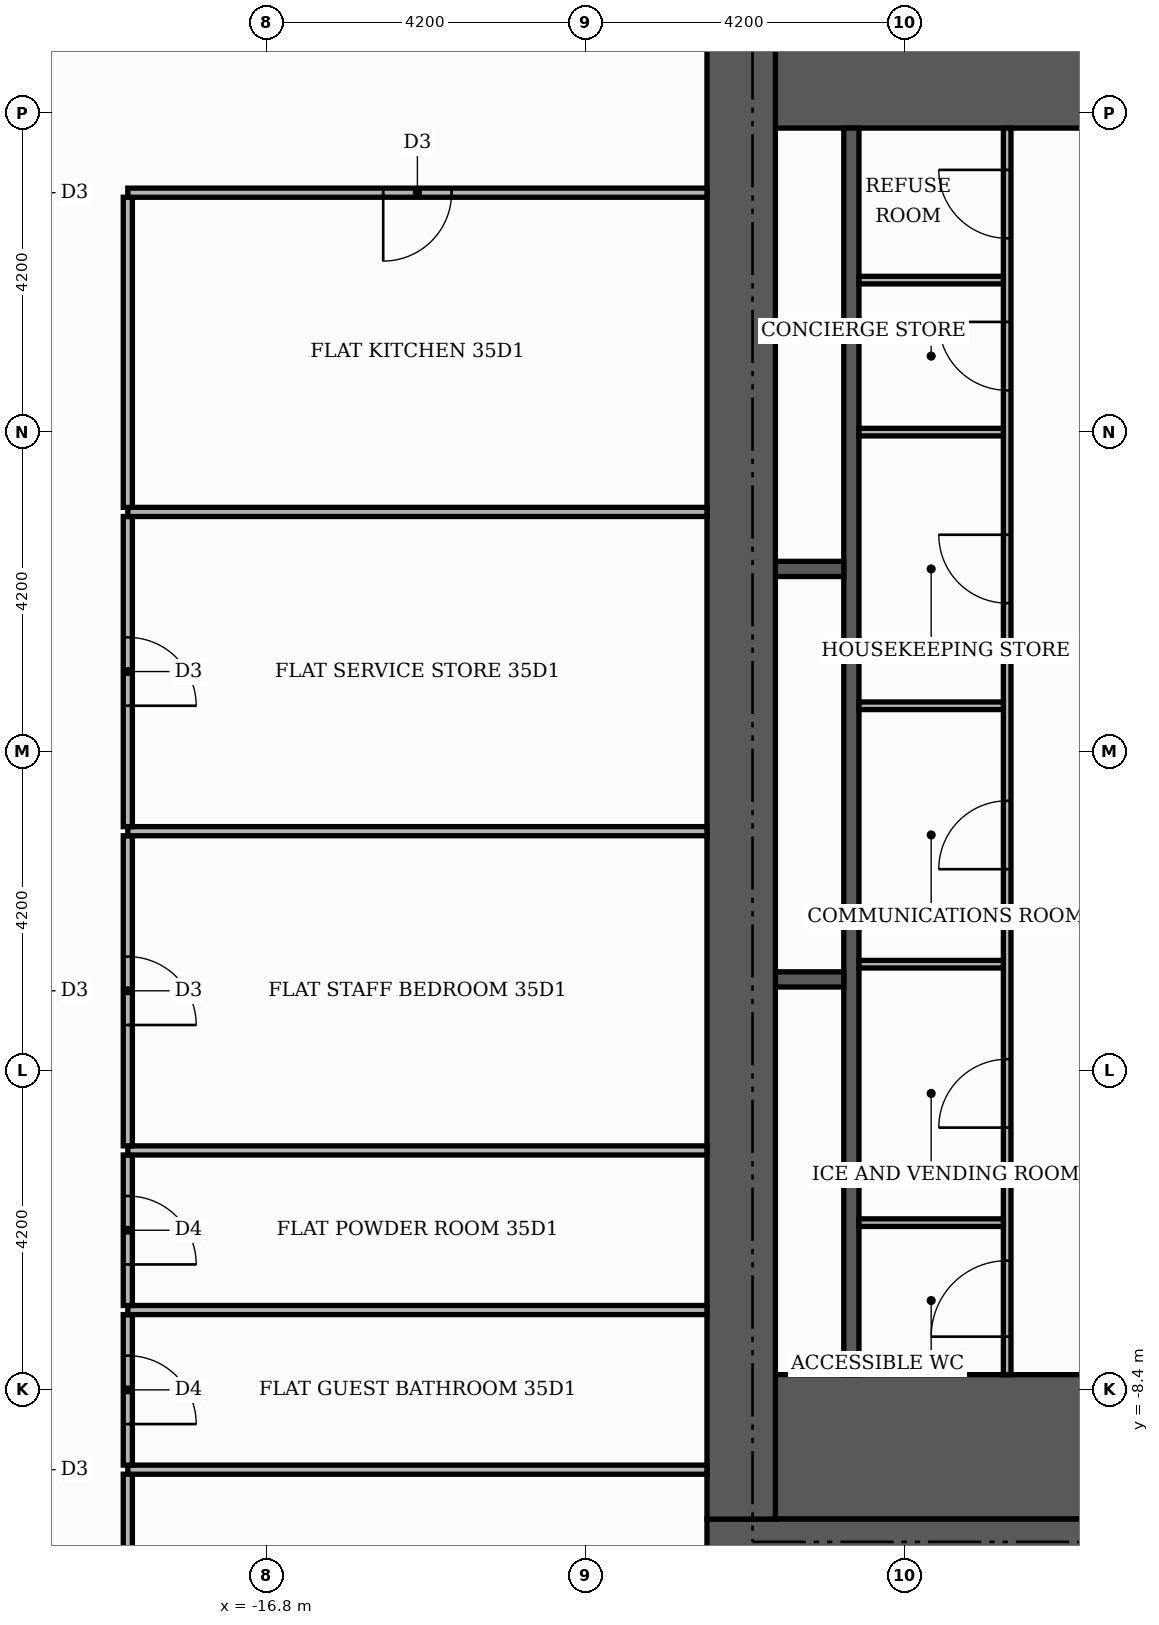
"""IFC4 building model, lengths in metres.
Left out: names, types, materials, properties, quantities, classifications, styles, units other than length and angle.
Written with IfcOpenShell. Run it as: python <this file> out.ifc"""

import sys

from ifc_helpers import new_model, si_unit, direction, frame, frame_2d, origin, place, context, subcontext, project, spatial, rectangle, extrude, element, fill, save


model = new_model("IFC4")
c1 = context("Model", 3, precision=1e-05, world=origin(), true_north=direction((0.0, 1.0)))
c2 = subcontext(c1, "Body", "Model", "MODEL_VIEW")
j1 = project(units=[si_unit("LENGTHUNIT", "METRE"), si_unit("PLANEANGLEUNIT", "RADIAN")], contexts=[c1])
p1 = place(None, origin())
s1 = spatial("IfcSite", under=j1, at=p1, CompositionType="ELEMENT")
p2 = place(p1, origin())
s2 = spatial("IfcBuilding", under=s1, at=p2, CompositionType="ELEMENT")
p3 = place(p2, frame((0.0, 0.0, 149.4)))
s3 = spatial("IfcBuildingStorey", under=s2, at=p3, CompositionType="ELEMENT", Elevation=149.4)
for number, where, z_axis, x_axis in (
    (1, (-10.1, -9.15, 0.0), (0.0, 0.0, 1.0), (1.0, 0.0, 0.0)),
    (2, (-10.1, 9.15, 0.0), (0.0, 0.0, 1.0), (1.0, 0.0, 0.0)),
):
    element("IfcWall", number, at=place(p3, frame(where, z_axis=z_axis, x_axis=x_axis)), inside=s3, PredefinedType="SHEAR", context=c2, shape_type="SweptSolid", body=[
        extrude(rectangle(XDim=4.6, YDim=1.9, at=frame_2d((2.3, 0.0))), origin(), (0.0, 0.0, 1.0), 3.48),
    ])
p4 = place(p3, frame((-9.1, -8.2, 0.0), z_axis=(0.0, 0.0, 1.0), x_axis=(0.0, 1.0, 0.0)))
e3 = element("IfcWall", 3, at=p4, inside=s3, PredefinedType="SHEAR", context=c2, shape_type="SweptSolid", body=[
    extrude(rectangle(XDim=16.4, YDim=0.2, at=frame_2d((8.2, 0.0))), origin(), (0.0, 0.0, 1.0), 3.48),
])
for number, where, z_axis, x_axis in (
    (4, (-10.1, -3.0, 0.0), (0.0, 0.0, 1.0), (1.0, 0.0, 0.0)),
    (5, (-10.1, 2.4, 0.0), (0.0, 0.0, 1.0), (1.0, 0.0, 0.0)),
):
    element("IfcWall", number, at=place(p3, frame(where, z_axis=z_axis, x_axis=x_axis)), inside=s3, PredefinedType="SHEAR", context=c2, shape_type="SweptSolid", body=[
        extrude(rectangle(XDim=0.9, YDim=0.2, at=frame_2d((0.45, 0.0))), origin(), (0.0, 0.0, 1.0), 3.48),
    ])
p5 = place(p3, frame((-11.0, -10.55, 0.0), z_axis=(0.0, 0.0, 1.0), x_axis=(1.0, 0.0, 0.0)))
e6 = element("IfcWall", 6, at=p5, inside=s3, PredefinedType="SHEAR", context=c2, shape_type="SweptSolid", body=[
    extrude(rectangle(XDim=22.0, YDim=0.9, at=frame_2d((11.0, 0.0))), origin(), (0.0, 0.0, 1.0), 3.48),
])
p6 = place(p5, frame((7.4, 0.0, 0.0)))
e7 = element("IfcOpeningElement", 7, at=p6, cuts=e6, PredefinedType="OPENING", context=c2, shape_type="SweptSolid", body=[
    extrude(rectangle(XDim=1.8, YDim=2.2, at=frame_2d((0.9, 1.1))), frame((0.0, 0.46, 0.0), z_axis=(0.0, -1.0, 0.0), x_axis=(1.0, 0.0, 0.0)), (0.0, 0.0, 1.0), 0.92),
])
p7 = place(p3, frame((-10.55, -10.1, 0.0), z_axis=(0.0, 0.0, 1.0), x_axis=(0.0, 1.0, 0.0)))
e8 = element("IfcWall", 8, at=p7, inside=s3, PredefinedType="SHEAR", context=c2, shape_type="SweptSolid", body=[
    extrude(rectangle(XDim=20.2, YDim=0.9, at=frame_2d((10.1, 0.0))), origin(), (0.0, 0.0, 1.0), 3.48),
])
p8 = place(p3, frame((-7.05, -8.2, 0.0), z_axis=(0.0, 0.0, 1.0), x_axis=(0.0, 1.0, 0.0)))
e9 = element("IfcWall", 9, at=p8, inside=s3, PredefinedType="PARTITIONING", context=c2, shape_type="SweptSolid", body=[
    extrude(rectangle(XDim=16.4, YDim=0.1, at=frame_2d((8.2, 0.0))), origin(), (0.0, 0.0, 1.0), 3.48),
])
p9 = place(p8, frame((0.5, 0.0, 0.0)))
e10 = element("IfcOpeningElement", 10, at=p9, cuts=e9, PredefinedType="OPENING", context=c2, shape_type="SweptSolid", body=[
    extrude(rectangle(XDim=1.0, YDim=2.1, at=frame_2d((0.5, 1.05))), frame((0.0, 0.06, 0.0), z_axis=(0.0, -1.0, 0.0), x_axis=(1.0, 0.0, 0.0)), (0.0, 0.0, 1.0), 0.12),
])
p10 = place(p8, frame((3.25, 0.0, 0.0)))
e11 = element("IfcOpeningElement", 11, at=p10, cuts=e9, PredefinedType="OPENING", context=c2, shape_type="SweptSolid", body=[
    extrude(rectangle(XDim=0.9, YDim=2.1, at=frame_2d((0.45, 1.05))), frame((0.0, 0.06, 0.0), z_axis=(0.0, -1.0, 0.0), x_axis=(1.0, 0.0, 0.0)), (0.0, 0.0, 1.0), 0.12),
])
p11 = place(p8, frame((6.65, 0.0, 0.0)))
e12 = element("IfcOpeningElement", 12, at=p11, cuts=e9, PredefinedType="OPENING", context=c2, shape_type="SweptSolid", body=[
    extrude(rectangle(XDim=0.9, YDim=2.1, at=frame_2d((0.45, 1.05))), frame((0.0, 0.06, 0.0), z_axis=(0.0, -1.0, 0.0), x_axis=(1.0, 0.0, 0.0)), (0.0, 0.0, 1.0), 0.12),
])
p12 = place(p8, frame((10.15, 0.0, 0.0)))
e13 = element("IfcOpeningElement", 13, at=p12, cuts=e9, PredefinedType="OPENING", context=c2, shape_type="SweptSolid", body=[
    extrude(rectangle(XDim=0.9, YDim=2.1, at=frame_2d((0.45, 1.05))), frame((0.0, 0.06, 0.0), z_axis=(0.0, -1.0, 0.0), x_axis=(1.0, 0.0, 0.0)), (0.0, 0.0, 1.0), 0.12),
])
p13 = place(p8, frame((12.95, 0.0, 0.0)))
e14 = element("IfcOpeningElement", 14, at=p13, cuts=e9, PredefinedType="OPENING", context=c2, shape_type="SweptSolid", body=[
    extrude(rectangle(XDim=0.9, YDim=2.1, at=frame_2d((0.45, 1.05))), frame((0.0, 0.06, 0.0), z_axis=(0.0, -1.0, 0.0), x_axis=(1.0, 0.0, 0.0)), (0.0, 0.0, 1.0), 0.12),
])
p14 = place(p8, frame((14.95, 0.0, 0.0)))
e15 = element("IfcOpeningElement", 15, at=p14, cuts=e9, PredefinedType="OPENING", context=c2, shape_type="SweptSolid", body=[
    extrude(rectangle(XDim=0.9, YDim=2.1, at=frame_2d((0.45, 1.05))), frame((0.0, 0.06, 0.0), z_axis=(0.0, -1.0, 0.0), x_axis=(1.0, 0.0, 0.0)), (0.0, 0.0, 1.0), 0.12),
])
for number, where, z_axis, x_axis in (
    (16, (-9.0, -6.2, 0.0), (0.0, 0.0, 1.0), (1.0, 0.0, 0.0)),
    (17, (-9.0, -2.8, 0.0), (0.0, 0.0, 1.0), (1.0, 0.0, 0.0)),
    (18, (-9.0, 0.6, 0.0), (0.0, 0.0, 1.0), (1.0, 0.0, 0.0)),
    (19, (-9.0, 4.2, 0.0), (0.0, 0.0, 1.0), (1.0, 0.0, 0.0)),
    (20, (-9.0, 6.2, 0.0), (0.0, 0.0, 1.0), (1.0, 0.0, 0.0)),
):
    element("IfcWall", number, at=place(p3, frame(where, z_axis=z_axis, x_axis=x_axis)), inside=s3, PredefinedType="PARTITIONING", context=c2, shape_type="SweptSolid", body=[
        extrude(rectangle(XDim=1.9, YDim=0.1, at=frame_2d((0.95, 0.0))), origin(), (0.0, 0.0, 1.0), 3.48),
    ])
p15 = place(p3, frame((-18.62, -13.55, 0.0), z_axis=(0.0, 0.0, 1.0), x_axis=(0.0, 1.0, 0.0)))
e21 = element("IfcWall", 21, at=p15, inside=s3, PredefinedType="PARTITIONING", context=c2, shape_type="SweptSolid", body=[
    extrude(rectangle(XDim=4.04, YDim=0.12, at=frame_2d((2.02, 0.0))), origin(), (0.0, 0.0, 1.0), 3.48),
])
p16 = place(p15, frame((1.55, 0.0, 0.0)))
e22 = element("IfcOpeningElement", 22, at=p16, cuts=e21, PredefinedType="OPENING", context=c2, shape_type="SweptSolid", body=[
    extrude(rectangle(XDim=0.9, YDim=2.1, at=frame_2d((0.45, 1.05))), frame((0.0, 0.07, 0.0), z_axis=(0.0, -1.0, 0.0), x_axis=(1.0, 0.0, 0.0)), (0.0, 0.0, 1.0), 0.14),
])
p17 = place(p3, frame((-18.62, -9.45, 0.0), z_axis=(0.0, 0.0, 1.0), x_axis=(1.0, 0.0, 0.0)))
e23 = element("IfcWall", 23, at=p17, inside=s3, PredefinedType="PARTITIONING", context=c2, shape_type="SweptSolid", body=[
    extrude(rectangle(XDim=7.62, YDim=0.12, at=frame_2d((3.81, 0.0))), origin(), (0.0, 0.0, 1.0), 3.48),
])
p18 = place(p3, frame((-18.62, -9.39, 0.0), z_axis=(0.0, 0.0, 1.0), x_axis=(0.0, 1.0, 0.0)))
e24 = element("IfcWall", 24, at=p18, inside=s3, PredefinedType="PARTITIONING", context=c2, shape_type="SweptSolid", body=[
    extrude(rectangle(XDim=1.98, YDim=0.12, at=frame_2d((0.99, 0.0))), origin(), (0.0, 0.0, 1.0), 3.48),
])
p19 = place(p18, frame((0.54, 0.0, 0.0)))
e25 = element("IfcOpeningElement", 25, at=p19, cuts=e24, PredefinedType="OPENING", context=c2, shape_type="SweptSolid", body=[
    extrude(rectangle(XDim=0.9, YDim=2.1, at=frame_2d((0.45, 1.05))), frame((0.0, 0.07, 0.0), z_axis=(0.0, -1.0, 0.0), x_axis=(1.0, 0.0, 0.0)), (0.0, 0.0, 1.0), 0.14),
])
p20 = place(p3, frame((-18.62, -7.35, 0.0), z_axis=(0.0, 0.0, 1.0), x_axis=(1.0, 0.0, 0.0)))
e26 = element("IfcWall", 26, at=p20, inside=s3, PredefinedType="PARTITIONING", context=c2, shape_type="SweptSolid", body=[
    extrude(rectangle(XDim=7.62, YDim=0.12, at=frame_2d((3.81, 0.0))), origin(), (0.0, 0.0, 1.0), 3.48),
])
p21 = place(p3, frame((-18.62, -7.29, 0.0), z_axis=(0.0, 0.0, 1.0), x_axis=(0.0, 1.0, 0.0)))
e27 = element("IfcWall", 27, at=p21, inside=s3, PredefinedType="PARTITIONING", context=c2, shape_type="SweptSolid", body=[
    extrude(rectangle(XDim=1.98, YDim=0.12, at=frame_2d((0.99, 0.0))), origin(), (0.0, 0.0, 1.0), 3.48),
])
p22 = place(p21, frame((0.54, 0.0, 0.0)))
e28 = element("IfcOpeningElement", 28, at=p22, cuts=e27, PredefinedType="OPENING", context=c2, shape_type="SweptSolid", body=[
    extrude(rectangle(XDim=0.9, YDim=2.1, at=frame_2d((0.45, 1.05))), frame((0.0, 0.07, 0.0), z_axis=(0.0, -1.0, 0.0), x_axis=(1.0, 0.0, 0.0)), (0.0, 0.0, 1.0), 0.14),
])
p23 = place(p3, frame((-18.62, -5.25, 0.0), z_axis=(0.0, 0.0, 1.0), x_axis=(1.0, 0.0, 0.0)))
e29 = element("IfcWall", 29, at=p23, inside=s3, PredefinedType="PARTITIONING", context=c2, shape_type="SweptSolid", body=[
    extrude(rectangle(XDim=7.62, YDim=0.12, at=frame_2d((3.81, 0.0))), origin(), (0.0, 0.0, 1.0), 3.48),
])
p24 = place(p3, frame((-18.62, -5.19, 0.0), z_axis=(0.0, 0.0, 1.0), x_axis=(0.0, 1.0, 0.0)))
e30 = element("IfcWall", 30, at=p24, inside=s3, PredefinedType="PARTITIONING", context=c2, shape_type="SweptSolid", body=[
    extrude(rectangle(XDim=4.08, YDim=0.12, at=frame_2d((2.04, 0.0))), origin(), (0.0, 0.0, 1.0), 3.48),
])
p25 = place(p24, frame((1.59, 0.0, 0.0)))
e31 = element("IfcOpeningElement", 31, at=p25, cuts=e30, PredefinedType="OPENING", context=c2, shape_type="SweptSolid", body=[
    extrude(rectangle(XDim=0.9, YDim=2.1, at=frame_2d((0.45, 1.05))), frame((0.0, 0.07, 0.0), z_axis=(0.0, -1.0, 0.0), x_axis=(1.0, 0.0, 0.0)), (0.0, 0.0, 1.0), 0.14),
])
p26 = place(p3, frame((-18.62, -1.05, 0.0), z_axis=(0.0, 0.0, 1.0), x_axis=(1.0, 0.0, 0.0)))
e32 = element("IfcWall", 32, at=p26, inside=s3, PredefinedType="PARTITIONING", context=c2, shape_type="SweptSolid", body=[
    extrude(rectangle(XDim=7.62, YDim=0.12, at=frame_2d((3.81, 0.0))), origin(), (0.0, 0.0, 1.0), 3.48),
])
p27 = place(p3, frame((-18.62, -0.99, 0.0), z_axis=(0.0, 0.0, 1.0), x_axis=(0.0, 1.0, 0.0)))
e33 = element("IfcWall", 33, at=p27, inside=s3, PredefinedType="PARTITIONING", context=c2, shape_type="SweptSolid", body=[
    extrude(rectangle(XDim=4.08, YDim=0.12, at=frame_2d((2.04, 0.0))), origin(), (0.0, 0.0, 1.0), 3.48),
])
p28 = place(p27, frame((1.59, 0.0, 0.0)))
e34 = element("IfcOpeningElement", 34, at=p28, cuts=e33, PredefinedType="OPENING", context=c2, shape_type="SweptSolid", body=[
    extrude(rectangle(XDim=0.9, YDim=2.1, at=frame_2d((0.45, 1.05))), frame((0.0, 0.07, 0.0), z_axis=(0.0, -1.0, 0.0), x_axis=(1.0, 0.0, 0.0)), (0.0, 0.0, 1.0), 0.14),
])
p29 = place(p3, frame((-18.62, 3.15, 0.0), z_axis=(0.0, 0.0, 1.0), x_axis=(1.0, 0.0, 0.0)))
e35 = element("IfcWall", 35, at=p29, inside=s3, PredefinedType="PARTITIONING", context=c2, shape_type="SweptSolid", body=[
    extrude(rectangle(XDim=7.62, YDim=0.12, at=frame_2d((3.81, 0.0))), origin(), (0.0, 0.0, 1.0), 3.48),
])
p30 = place(p3, frame((-18.62, 3.21, 0.0), z_axis=(0.0, 0.0, 1.0), x_axis=(0.0, 1.0, 0.0)))
e36 = element("IfcWall", 36, at=p30, inside=s3, PredefinedType="PARTITIONING", context=c2, shape_type="SweptSolid", body=[
    extrude(rectangle(XDim=4.08, YDim=0.12, at=frame_2d((2.04, 0.0))), origin(), (0.0, 0.0, 1.0), 3.48),
])
p31 = place(p3, frame((-18.62, 7.35, 0.0), z_axis=(0.0, 0.0, 1.0), x_axis=(1.0, 0.0, 0.0)))
e37 = element("IfcWall", 37, at=p31, inside=s3, PredefinedType="PARTITIONING", context=c2, shape_type="SweptSolid", body=[
    extrude(rectangle(XDim=7.62, YDim=0.12, at=frame_2d((3.81, 0.0))), origin(), (0.0, 0.0, 1.0), 3.48),
])
p32 = place(p31, frame((3.36, 0.0, 0.0)))
e38 = element("IfcOpeningElement", 38, at=p32, cuts=e37, PredefinedType="OPENING", context=c2, shape_type="SweptSolid", body=[
    extrude(rectangle(XDim=0.9, YDim=2.1, at=frame_2d((0.45, 1.05))), frame((0.0, 0.07, 0.0), z_axis=(0.0, -1.0, 0.0), x_axis=(1.0, 0.0, 0.0)), (0.0, 0.0, 1.0), 0.14),
])
p33 = place(p9, origin())
e39 = element("IfcDoor", 39, at=p33, inside=s3, OperationType="SINGLE_SWING_LEFT", PredefinedType="DOOR", context=c2, shape_type="SweptSolid", body=[
    extrude(rectangle(XDim=1.0, YDim=2.1, at=frame_2d((0.5, 1.05))), frame((0.0, 0.025, 0.0), z_axis=(0.0, -1.0, 0.0), x_axis=(1.0, 0.0, 0.0)), (0.0, 0.0, 1.0), 0.05),
])
fill(e10, e39)
p34 = place(p10, origin())
e40 = element("IfcDoor", 40, at=p34, inside=s3, OperationType="SINGLE_SWING_LEFT", PredefinedType="DOOR", context=c2, shape_type="SweptSolid", body=[
    extrude(rectangle(XDim=0.9, YDim=2.1, at=frame_2d((0.45, 1.05))), frame((0.0, 0.025, 0.0), z_axis=(0.0, -1.0, 0.0), x_axis=(1.0, 0.0, 0.0)), (0.0, 0.0, 1.0), 0.05),
])
fill(e11, e40)
p35 = place(p11, origin())
e41 = element("IfcDoor", 41, at=p35, inside=s3, OperationType="SINGLE_SWING_LEFT", PredefinedType="DOOR", context=c2, shape_type="SweptSolid", body=[
    extrude(rectangle(XDim=0.9, YDim=2.1, at=frame_2d((0.45, 1.05))), frame((0.0, 0.025, 0.0), z_axis=(0.0, -1.0, 0.0), x_axis=(1.0, 0.0, 0.0)), (0.0, 0.0, 1.0), 0.05),
])
fill(e12, e41)
p36 = place(p12, origin())
e42 = element("IfcDoor", 42, at=p36, inside=s3, OperationType="SINGLE_SWING_RIGHT", PredefinedType="DOOR", context=c2, shape_type="SweptSolid", body=[
    extrude(rectangle(XDim=0.9, YDim=2.1, at=frame_2d((0.45, 1.05))), frame((0.0, 0.025, 0.0), z_axis=(0.0, -1.0, 0.0), x_axis=(1.0, 0.0, 0.0)), (0.0, 0.0, 1.0), 0.05),
])
fill(e13, e42)
p37 = place(p13, origin())
e43 = element("IfcDoor", 43, at=p37, inside=s3, OperationType="SINGLE_SWING_RIGHT", PredefinedType="DOOR", context=c2, shape_type="SweptSolid", body=[
    extrude(rectangle(XDim=0.9, YDim=2.1, at=frame_2d((0.45, 1.05))), frame((0.0, 0.025, 0.0), z_axis=(0.0, -1.0, 0.0), x_axis=(1.0, 0.0, 0.0)), (0.0, 0.0, 1.0), 0.05),
])
fill(e14, e43)
p38 = place(p14, origin())
e44 = element("IfcDoor", 44, at=p38, inside=s3, OperationType="SINGLE_SWING_RIGHT", PredefinedType="DOOR", context=c2, shape_type="SweptSolid", body=[
    extrude(rectangle(XDim=0.9, YDim=2.1, at=frame_2d((0.45, 1.05))), frame((0.0, 0.025, 0.0), z_axis=(0.0, -1.0, 0.0), x_axis=(1.0, 0.0, 0.0)), (0.0, 0.0, 1.0), 0.05),
])
fill(e15, e44)
p39 = place(p32, frame((0.9, 0.0, 0.0), z_axis=(0.0, 0.0, 1.0), x_axis=(-1.0, 0.0, 0.0)))
e45 = element("IfcDoor", 45, at=p39, inside=s3, OperationType="SINGLE_SWING_LEFT", PredefinedType="DOOR", context=c2, shape_type="SweptSolid", body=[
    extrude(rectangle(XDim=0.9, YDim=2.1, at=frame_2d((0.45, 1.05))), frame((0.0, 0.025, 0.0), z_axis=(0.0, -1.0, 0.0), x_axis=(1.0, 0.0, 0.0)), (0.0, 0.0, 1.0), 0.05),
])
fill(e38, e45)
p40 = place(p28, frame((0.9, 0.0, 0.0), z_axis=(0.0, 0.0, 1.0), x_axis=(-1.0, 0.0, 0.0)))
e46 = element("IfcDoor", 46, at=p40, inside=s3, OperationType="SINGLE_SWING_LEFT", PredefinedType="DOOR", context=c2, shape_type="SweptSolid", body=[
    extrude(rectangle(XDim=0.9, YDim=2.1, at=frame_2d((0.45, 1.05))), frame((0.0, 0.025, 0.0), z_axis=(0.0, -1.0, 0.0), x_axis=(1.0, 0.0, 0.0)), (0.0, 0.0, 1.0), 0.05),
])
fill(e34, e46)
p41 = place(p25, frame((0.9, 0.0, 0.0), z_axis=(0.0, 0.0, 1.0), x_axis=(-1.0, 0.0, 0.0)))
e47 = element("IfcDoor", 47, at=p41, inside=s3, OperationType="SINGLE_SWING_LEFT", PredefinedType="DOOR", context=c2, shape_type="SweptSolid", body=[
    extrude(rectangle(XDim=0.9, YDim=2.1, at=frame_2d((0.45, 1.05))), frame((0.0, 0.025, 0.0), z_axis=(0.0, -1.0, 0.0), x_axis=(1.0, 0.0, 0.0)), (0.0, 0.0, 1.0), 0.05),
])
fill(e31, e47)
p42 = place(p22, frame((0.9, 0.0, 0.0), z_axis=(0.0, 0.0, 1.0), x_axis=(-1.0, 0.0, 0.0)))
e48 = element("IfcDoor", 48, at=p42, inside=s3, OperationType="SINGLE_SWING_LEFT", PredefinedType="DOOR", context=c2, shape_type="SweptSolid", body=[
    extrude(rectangle(XDim=0.9, YDim=2.1, at=frame_2d((0.45, 1.05))), frame((0.0, 0.025, 0.0), z_axis=(0.0, -1.0, 0.0), x_axis=(1.0, 0.0, 0.0)), (0.0, 0.0, 1.0), 0.05),
])
fill(e28, e48)
p43 = place(p19, frame((0.9, 0.0, 0.0), z_axis=(0.0, 0.0, 1.0), x_axis=(-1.0, 0.0, 0.0)))
e49 = element("IfcDoor", 49, at=p43, inside=s3, OperationType="SINGLE_SWING_LEFT", PredefinedType="DOOR", context=c2, shape_type="SweptSolid", body=[
    extrude(rectangle(XDim=0.9, YDim=2.1, at=frame_2d((0.45, 1.05))), frame((0.0, 0.025, 0.0), z_axis=(0.0, -1.0, 0.0), x_axis=(1.0, 0.0, 0.0)), (0.0, 0.0, 1.0), 0.05),
])
fill(e25, e49)
save(model, sys.argv[1])
